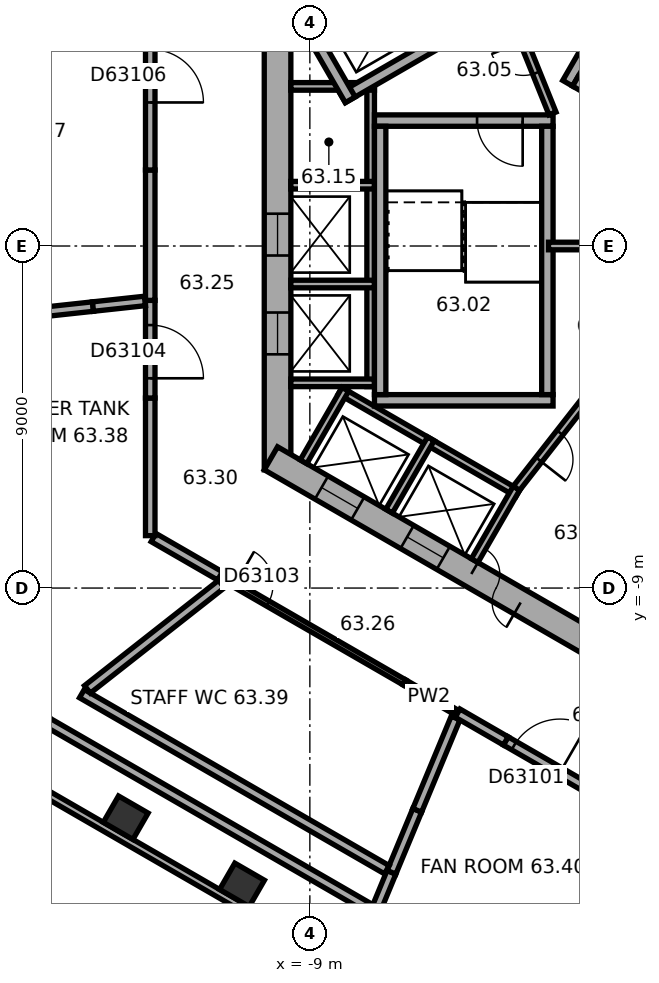
"""IFC4 building model, lengths in metres.
Left out: names, types, materials, properties, quantities, classifications, styles, units other than length and angle.
Written with IfcOpenShell. Run it as: python <this file> out.ifc"""

import sys

from ifc_helpers import new_model, si_unit, direction, frame, frame_2d, origin, origin_2d, place, context, subcontext, project, spatial, rectangle, extrude, element, fill, save


model = new_model("IFC4")
c1 = context("Model", 3, precision=1e-05, world=origin(), true_north=direction((0.0, 1.0)))
c2 = subcontext(c1, "Body", "Model", "MODEL_VIEW")
j1 = project(units=[si_unit("LENGTHUNIT", "METRE"), si_unit("PLANEANGLEUNIT", "RADIAN")], contexts=[c1])
p1 = place(None, origin())
s1 = spatial("IfcSite", under=j1, at=p1, CompositionType="ELEMENT")
p2 = place(p1, origin())
s2 = spatial("IfcBuilding", under=s1, at=p2, CompositionType="ELEMENT")
p3 = place(p2, frame((0.0, 0.0, 255.0)))
s3 = spatial("IfcBuildingStorey", under=s2, at=p3, CompositionType="ELEMENT", Elevation=255.0)
for number, where, z_axis, x_axis in (
    (1, (-13.845, -15.042, 0.0), (0.0, 0.0, 1.0), (0.866, -0.5, 0.0)),
    (2, (-10.785, -16.809, 0.0), (0.0, 0.0, 1.0), (0.866, -0.5, 0.0)),
):
    element("IfcColumn", number, at=place(p3, frame(where, z_axis=z_axis, x_axis=x_axis)), inside=s3, PredefinedType="COLUMN", context=c2, shape_type="SweptSolid", body=[
        extrude(rectangle(XDim=0.9, YDim=0.8, at=origin_2d()), origin(), (0.0, 0.0, 1.0), 4.8),
    ])
p4 = place(p3, frame((-9.85, 5.889, 0.0), z_axis=(0.0, 0.0, 1.0), x_axis=(0.0, -1.0, 0.0)))
e3 = element("IfcWall", 3, at=p4, inside=s3, PredefinedType="SHEAR", context=c2, shape_type="SweptSolid", body=[
    extrude(rectangle(XDim=11.778, YDim=0.7, at=frame_2d((5.889, 0.0))), origin(), (0.0, 0.0, 1.0), 4.8),
])
p5 = place(p4, frame((5.039, 0.0, 0.0)))
e4 = element("IfcOpeningElement", 4, at=p5, cuts=e3, PredefinedType="OPENING", context=c2, shape_type="SweptSolid", body=[
    extrude(rectangle(XDim=1.1, YDim=2.1, at=frame_2d((0.55, 1.05))), frame((0.0, 0.36, 0.0), z_axis=(0.0, -1.0, 0.0), x_axis=(1.0, 0.0, 0.0)), (0.0, 0.0, 1.0), 0.72),
])
p6 = place(p4, frame((7.639, 0.0, 0.0)))
e5 = element("IfcOpeningElement", 5, at=p6, cuts=e3, PredefinedType="OPENING", context=c2, shape_type="SweptSolid", body=[
    extrude(rectangle(XDim=1.1, YDim=2.1, at=frame_2d((0.55, 1.05))), frame((0.0, 0.36, 0.0), z_axis=(0.0, -1.0, 0.0), x_axis=(1.0, 0.0, 0.0)), (0.0, 0.0, 1.0), 0.72),
])
p7 = place(p3, frame((-10.025, -5.586, 0.0), z_axis=(0.0, 0.0, 1.0), x_axis=(0.866026453023, -0.499998182661, 0.0)))
e6 = element("IfcWall", 6, at=p7, inside=s3, PredefinedType="SHEAR", context=c2, shape_type="SweptSolid", body=[
    extrude(rectangle(XDim=11.778, YDim=0.7, at=frame_2d((5.889, 0.0))), origin(), (0.0, 0.0, 1.0), 4.8),
])
p8 = place(p7, frame((6.089, 0.0, 0.0)))
e7 = element("IfcOpeningElement", 7, at=p8, cuts=e6, PredefinedType="OPENING", context=c2, shape_type="SweptSolid", body=[
    extrude(rectangle(XDim=1.5, YDim=2.1, at=frame_2d((0.75, 1.05))), frame((0.0, 0.36, 0.0), z_axis=(0.0, -1.0, 0.0), x_axis=(1.0, 0.0, 0.0)), (0.0, 0.0, 1.0), 0.72),
])
p9 = place(p7, frame((1.539, 0.0, 0.0)))
e8 = element("IfcOpeningElement", 8, at=p9, cuts=e6, PredefinedType="OPENING", context=c2, shape_type="SweptSolid", body=[
    extrude(rectangle(XDim=1.1, YDim=2.1, at=frame_2d((0.55, 1.05))), frame((0.0, 0.36, 0.0), z_axis=(0.0, -1.0, 0.0), x_axis=(1.0, 0.0, 0.0)), (0.0, 0.0, 1.0), 0.72),
])
p10 = place(p7, frame((4.139, 0.0, 0.0)))
e9 = element("IfcOpeningElement", 9, at=p10, cuts=e6, PredefinedType="OPENING", context=c2, shape_type="SweptSolid", body=[
    extrude(rectangle(XDim=1.1, YDim=2.1, at=frame_2d((0.55, 1.05))), frame((0.0, 0.36, 0.0), z_axis=(0.0, -1.0, 0.0), x_axis=(1.0, 0.0, 0.0)), (0.0, 0.0, 1.0), 0.72),
])
p11 = place(p3, frame((-17.664, -13.415, 0.0), z_axis=(0.0, 0.0, 1.0), x_axis=(0.866026555358, -0.49999800541, 0.0)))
e10 = element("IfcWall", 10, at=p11, inside=s3, PredefinedType="STANDARD", context=c2, shape_type="SweptSolid", body=[
    extrude(rectangle(XDim=18.841, YDim=0.2, at=frame_2d((9.421, 0.0))), origin(), (0.0, 0.0, 1.0), 4.8),
])
p12 = place(p3, frame((-7.4, 4.3, 0.0), z_axis=(0.0, 0.0, 1.0), x_axis=(0.0, -1.0, 0.0)))
e11 = element("IfcWall", 11, at=p12, inside=s3, PredefinedType="PARTITIONING", context=c2, shape_type="SweptSolid", body=[
    extrude(rectangle(XDim=8.0, YDim=0.2, at=frame_2d((4.0, 0.0))), origin(), (0.0, 0.0, 1.0), 4.52),
])
for number, where, z_axis, x_axis in (
    (12, (-7.3, 4.2, 0.0), (0.0, 0.0, 1.0), (-1.0, 0.0, 0.0)),
    (13, (-7.3, 1.6, 0.0), (0.0, 0.0, 1.0), (-1.0, 0.0, 0.0)),
    (14, (-7.3, -1.0, 0.0), (0.0, 0.0, 1.0), (-1.0, 0.0, 0.0)),
    (15, (-7.3, -3.6, 0.0), (0.0, 0.0, 1.0), (-1.0, 0.0, 0.0)),
):
    element("IfcWall", number, at=place(p3, frame(where, z_axis=z_axis, x_axis=x_axis)), inside=s3, PredefinedType="PARTITIONING", context=c2, shape_type="SweptSolid", body=[
        extrude(rectangle(XDim=2.2, YDim=0.2, at=frame_2d((1.1, 0.0))), origin(), (0.0, 0.0, 1.0), 4.52),
    ])
p13 = place(p3, frame((-8.203, -3.809, 0.0), z_axis=(0.0, 0.0, 1.0), x_axis=(0.866028230842, -0.499995103361, 0.0)))
e16 = element("IfcWall", 16, at=p13, inside=s3, PredefinedType="PARTITIONING", context=c2, shape_type="SweptSolid", body=[
    extrude(rectangle(XDim=5.4, YDim=0.2, at=frame_2d((2.7, 0.0))), origin(), (0.0, 0.0, 1.0), 4.52),
])
for number, where, z_axis, x_axis in (
    (17, (-8.067, -3.772, 0.0), (0.0, 0.0, 1.0), (-0.5, -0.866, 0.0)),
    (18, (-5.815, -5.072, 0.0), (0.0, 0.0, 1.0), (-0.5, -0.866, 0.0)),
):
    element("IfcWall", number, at=place(p3, frame(where, z_axis=z_axis, x_axis=x_axis)), inside=s3, PredefinedType="PARTITIONING", context=c2, shape_type="SweptSolid", body=[
        extrude(rectangle(XDim=2.2, YDim=0.2, at=frame_2d((1.1, 0.0))), origin(), (0.0, 0.0, 1.0), 4.52),
    ])
p14 = place(p3, frame((-3.563, -6.372, 0.0), z_axis=(0.0, 0.0, 1.0), x_axis=(-0.499994660107, -0.866028486751, 0.0)))
e19 = element("IfcWall", 19, at=p14, inside=s3, PredefinedType="PARTITIONING", context=c2, shape_type="SweptSolid", body=[
    extrude(rectangle(XDim=2.2, YDim=0.2, at=frame_2d((1.1, 0.0))), origin(), (0.0, 0.0, 1.0), 4.52),
])
p15 = place(p3, frame((-2.216, 4.282, 0.0), z_axis=(0.0, 0.0, 1.0), x_axis=(0.499977259774, 0.866038532462, 0.0)))
e20 = element("IfcWall", 20, at=p15, inside=s3, PredefinedType="SHEAR", context=c2, shape_type="SweptSolid", body=[
    extrude(rectangle(XDim=4.7, YDim=0.3, at=frame_2d((2.35, 0.0))), origin(), (0.0, 0.0, 1.0), 4.52),
])
p16 = place(p3, frame((4.103, 0.807, 0.0), z_axis=(0.0, 0.0, 1.0), x_axis=(-0.866027801685, 0.499995846692, 0.0)))
e21 = element("IfcWall", 21, at=p16, inside=s3, PredefinedType="SHEAR", context=c2, shape_type="SweptSolid", body=[
    extrude(rectangle(XDim=7.06, YDim=0.3, at=frame_2d((3.53, 0.0))), origin(), (0.0, 0.0, 1.0), 4.52),
])
p17 = place(p3, frame((-2.6, 3.3, 0.0), z_axis=(0.0, 0.0, 1.0), x_axis=(-1.0, 0.0, 0.0)))
e22 = element("IfcWall", 22, at=p17, inside=s3, PredefinedType="SHEAR", context=c2, shape_type="SweptSolid", body=[
    extrude(rectangle(XDim=4.7, YDim=0.3, at=frame_2d((2.35, 0.0))), origin(), (0.0, 0.0, 1.0), 4.52),
])
p18 = place(p17, frame((0.8, 0.0, 0.0)))
e23 = element("IfcOpeningElement", 23, at=p18, cuts=e22, PredefinedType="OPENING", context=c2, shape_type="SweptSolid", body=[
    extrude(rectangle(XDim=1.2, YDim=2.1, at=frame_2d((0.6, 1.05))), frame((0.0, 0.16, 0.0), z_axis=(0.0, -1.0, 0.0), x_axis=(1.0, 0.0, 0.0)), (0.0, 0.0, 1.0), 0.32),
])
p19 = place(p3, frame((-2.6, -4.06, 0.0), z_axis=(0.0, 0.0, 1.0), x_axis=(-1.0, 0.0, 0.0)))
e24 = element("IfcWall", 24, at=p19, inside=s3, PredefinedType="SHEAR", context=c2, shape_type="SweptSolid", body=[
    extrude(rectangle(XDim=4.7, YDim=0.3, at=frame_2d((2.35, 0.0))), origin(), (0.0, 0.0, 1.0), 4.52),
])
for number, where, z_axis, x_axis in (
    (25, (-2.75, 3.15, 0.0), (0.0, 0.0, 1.0), (0.0, -1.0, 0.0)),
    (26, (-7.15, 3.15, 0.0), (0.0, 0.0, 1.0), (0.0, -1.0, 0.0)),
):
    element("IfcWall", number, at=place(p3, frame(where, z_axis=z_axis, x_axis=x_axis)), inside=s3, PredefinedType="SHEAR", context=c2, shape_type="SweptSolid", body=[
        extrude(rectangle(XDim=7.06, YDim=0.3, at=frame_2d((3.53, 0.0))), origin(), (0.0, 0.0, 1.0), 4.52),
    ])
p20 = place(p3, frame((-5.24, 5.577, 0.0), z_axis=(0.0, 0.0, 1.0), x_axis=(-0.866014461049, -0.500018952895, 0.0)))
e27 = element("IfcWall", 27, at=p20, inside=s3, PredefinedType="SHEAR", context=c2, shape_type="SweptSolid", body=[
    extrude(rectangle(XDim=3.35, YDim=0.3, at=frame_2d((1.675, 0.0))), origin(), (0.0, 0.0, 1.0), 4.52),
])
p21 = place(p3, frame((-7.937, 3.847, 0.0), z_axis=(0.0, 0.0, 1.0), x_axis=(-0.50002983664, 0.866008176907, 0.0)))
e28 = element("IfcWall", 28, at=p21, inside=s3, PredefinedType="SHEAR", context=c2, shape_type="SweptSolid", body=[
    extrude(rectangle(XDim=2.2, YDim=0.3, at=frame_2d((1.1, 0.0))), origin(), (0.0, 0.0, 1.0), 4.52),
])
p22 = place(p3, frame((-2.615, 3.487, 0.0), z_axis=(0.0, 0.0, 1.0), x_axis=(-0.373576831041, 0.92759924068, 0.0)))
e29 = element("IfcWall", 29, at=p22, inside=s3, PredefinedType="PARTITIONING", context=c2, shape_type="SweptSolid", body=[
    extrude(rectangle(XDim=3.002, YDim=0.2, at=frame_2d((1.501, 0.0))), origin(), (0.0, 0.0, 1.0), 4.52),
])
p23 = place(p22, frame((1.15, 0.0, 0.0)))
e30 = element("IfcOpeningElement", 30, at=p23, cuts=e29, PredefinedType="OPENING", context=c2, shape_type="SweptSolid", body=[
    extrude(rectangle(XDim=0.9, YDim=2.1, at=frame_2d((0.45, 1.05))), frame((0.0, 0.11, 0.0), z_axis=(0.0, -1.0, 0.0), x_axis=(1.0, 0.0, 0.0)), (0.0, 0.0, 1.0), 0.22),
])
p24 = place(p3, frame((-1.712, -4.008, 0.0), z_axis=(0.0, 0.0, 1.0), x_axis=(-0.616549420702, -0.787316208287, 0.0)))
e31 = element("IfcWall", 31, at=p24, inside=s3, PredefinedType="PARTITIONING", context=c2, shape_type="SweptSolid", body=[
    extrude(rectangle(XDim=3.002, YDim=0.2, at=frame_2d((1.501, 0.0))), origin(), (0.0, 0.0, 1.0), 4.52),
])
p25 = place(p24, frame((1.15, 0.0, 0.0)))
e32 = element("IfcOpeningElement", 32, at=p25, cuts=e31, PredefinedType="OPENING", context=c2, shape_type="SweptSolid", body=[
    extrude(rectangle(XDim=0.9, YDim=2.1, at=frame_2d((0.45, 1.05))), frame((0.0, 0.11, 0.0), z_axis=(0.0, -1.0, 0.0), x_axis=(1.0, 0.0, 0.0)), (0.0, 0.0, 1.0), 0.22),
])
p26 = place(p3, frame((-0.68, 0.0, 0.0), z_axis=(0.0, 0.0, 1.0), x_axis=(-1.0, 0.0, 0.0)))
e33 = element("IfcWall", 33, at=p26, inside=s3, PredefinedType="PARTITIONING", context=c2, shape_type="SweptSolid", body=[
    extrude(rectangle(XDim=2.04, YDim=0.2, at=frame_2d((1.02, 0.0))), origin(), (0.0, 0.0, 1.0), 4.52),
])
p27 = place(p3, frame((-7.292, -17.504, 0.0), z_axis=(0.0, 0.0, 1.0), x_axis=(-0.866024002353, 0.500002427343, 0.0)))
e34 = element("IfcWall", 34, at=p27, inside=s3, PredefinedType="SOLIDWALL", context=c2, shape_type="SweptSolid", body=[
    extrude(rectangle(XDim=9.964, YDim=0.25, at=frame_2d((4.982, 0.0))), origin(), (0.0, 0.0, 1.0), 4.02),
])
p28 = place(p3, frame((-7.223, -17.375, 0.0), z_axis=(0.0, 0.0, 1.0), x_axis=(0.382374085118, 0.924007607669, 0.0)))
e35 = element("IfcWall", 35, at=p28, inside=s3, PredefinedType="SOLIDWALL", context=c2, shape_type="SweptSolid", body=[
    extrude(rectangle(XDim=0.967, YDim=0.25, at=frame_2d((0.484, 0.0))), origin(), (0.0, 0.0, 1.0), 3.6),
])
p29 = place(p3, frame((-6.853, -16.479, 0.0), z_axis=(0.0, 0.0, 1.0), x_axis=(0.38378052161, 0.923424339745, 0.0)))
e36 = element("IfcWall", 36, at=p29, inside=s3, PredefinedType="SOLIDWALL", context=c2, shape_type="SweptSolid", body=[
    extrude(rectangle(XDim=1.765, YDim=0.25, at=frame_2d((0.883, 0.0))), origin(), (0.0, 0.0, 1.0), 3.6),
])
p30 = place(p3, frame((-6.975, -16.411, 0.0), z_axis=(0.0, 0.0, 1.0), x_axis=(-0.866045613381, 0.499964994319, 0.0)))
e37 = element("IfcWall", 37, at=p30, inside=s3, PredefinedType="SOLIDWALL", context=c2, shape_type="SweptSolid", body=[
    extrude(rectangle(XDim=9.265, YDim=0.25, at=frame_2d((4.633, 0.0))), origin(), (0.0, 0.0, 1.0), 4.52),
])
p31 = place(p3, frame((-6.175, -14.848, 0.0), z_axis=(0.0, 0.0, 1.0), x_axis=(0.383969284398, 0.923345866205, 0.0)))
e38 = element("IfcWall", 38, at=p31, inside=s3, PredefinedType="SOLIDWALL", context=c2, shape_type="SweptSolid", body=[
    extrude(rectangle(XDim=2.63, YDim=0.25, at=frame_2d((1.315, 0.0))), origin(), (0.0, 0.0, 1.0), 3.6),
])
p32 = place(p3, frame((-1.062, -14.629, 0.0), z_axis=(0.0, 0.0, 1.0), x_axis=(-0.866018596809, 0.500011789842, 0.0)))
e39 = element("IfcWall", 39, at=p32, inside=s3, PredefinedType="SOLIDWALL", context=c2, shape_type="SweptSolid", body=[
    extrude(rectangle(XDim=3.214, YDim=0.25, at=frame_2d((1.607, 0.0))), origin(), (0.0, 0.0, 1.0), 4.52),
])
p33 = place(p32, frame((1.564, 0.0, 0.0)))
e40 = element("IfcOpeningElement", 40, at=p33, cuts=e39, PredefinedType="OPENING", context=c2, shape_type="SweptSolid", body=[
    extrude(rectangle(XDim=1.4, YDim=2.1, at=frame_2d((0.7, 1.05))), frame((0.0, 0.135, 0.0), z_axis=(0.0, -1.0, 0.0), x_axis=(1.0, 0.0, 0.0)), (0.0, 0.0, 1.0), 0.27),
])
p34 = place(p3, frame((-3.845, -13.022, 0.0), z_axis=(0.0, 0.0, 1.0), x_axis=(-0.866088314402, 0.499891019779, 0.0)))
e41 = element("IfcWall", 41, at=p34, inside=s3, PredefinedType="SOLIDWALL", context=c2, shape_type="SweptSolid", body=[
    extrude(rectangle(XDim=1.463, YDim=0.25, at=frame_2d((0.731, 0.0))), origin(), (0.0, 0.0, 1.0), 4.52),
])
p35 = place(p3, frame((-14.853, -11.666, 0.0), z_axis=(0.0, 0.0, 1.0), x_axis=(0.786320228008, 0.617819147506, 0.0)))
e42 = element("IfcWall", 42, at=p35, inside=s3, PredefinedType="SOLIDWALL", context=c2, shape_type="SweptSolid", body=[
    extrude(rectangle(XDim=4.484, YDim=0.25, at=frame_2d((2.242, 0.0))), origin(), (0.0, 0.0, 1.0), 3.6),
])
p36 = place(p3, frame((-6.513, -11.481, 0.0), z_axis=(0.0, 0.0, 1.0), x_axis=(0.866009279501, -0.500027927039, 0.0)))
e43 = element("IfcWall", 43, at=p36, inside=s3, PredefinedType="PARTITIONING", context=c2, shape_type="SweptSolid", body=[
    extrude(rectangle(XDim=1.499, YDim=0.15, at=frame_2d((0.75, 0.0))), origin(), (0.0, 0.0, 1.0), 4.52),
])
p37 = place(p3, frame((-11.186, -8.784, 0.0), z_axis=(0.0, 0.0, 1.0), x_axis=(0.866020546064, -0.500008413725, 0.0)))
e44 = element("IfcWall", 44, at=p37, inside=s3, PredefinedType="PARTITIONING", context=c2, shape_type="SweptSolid", body=[
    extrude(rectangle(XDim=5.395, YDim=0.15, at=frame_2d((2.698, 0.0))), origin(), (0.0, 0.0, 1.0), 4.52),
])
p38 = place(p37, frame((0.25, 0.0, 0.0)))
e45 = element("IfcOpeningElement", 45, at=p38, cuts=e44, PredefinedType="OPENING", context=c2, shape_type="SweptSolid", body=[
    extrude(rectangle(XDim=1.0, YDim=2.1, at=frame_2d((0.5, 1.05))), frame((0.0, 0.085, 0.0), z_axis=(0.0, -1.0, 0.0), x_axis=(1.0, 0.0, 0.0)), (0.0, 0.0, 1.0), 0.17),
])
p39 = place(p3, frame((-11.363, -8.681, 0.0), z_axis=(0.0, 0.0, 1.0), x_axis=(0.865888002441, -0.500237910626, 0.0)))
e46 = element("IfcWall", 46, at=p39, inside=s3, PredefinedType="SOLIDWALL", context=c2, shape_type="SweptSolid", body=[
    extrude(rectangle(XDim=0.205, YDim=0.25, at=frame_2d((0.103, 0.0))), origin(), (0.0, 0.0, 1.0), 4.52),
])
p40 = place(p3, frame((-13.113, -7.671, 0.0), z_axis=(0.0, 0.0, 1.0), x_axis=(0.866026663364, -0.499997818338, 0.0)))
e47 = element("IfcWall", 47, at=p40, inside=s3, PredefinedType="SOLIDWALL", context=c2, shape_type="SweptSolid", body=[
    extrude(rectangle(XDim=2.021, YDim=0.25, at=frame_2d((1.01, 0.0))), origin(), (0.0, 0.0, 1.0), 4.52),
])
p41 = place(p3, frame((-13.2, -7.621, 0.0), z_axis=(0.0, 0.0, 1.0), x_axis=(0.0, 1.0, 0.0)))
e48 = element("IfcWall", 48, at=p41, inside=s3, PredefinedType="SOLIDWALL", context=c2, shape_type="SweptSolid", body=[
    extrude(rectangle(XDim=3.621, YDim=0.25, at=frame_2d((1.811, 0.0))), origin(), (0.0, 0.0, 1.0), 4.52),
])
p42 = place(p3, frame((-13.2, -4.0, 0.0), z_axis=(0.0, 0.0, 1.0), x_axis=(0.0, 1.0, 0.0)))
e49 = element("IfcWall", 49, at=p42, inside=s3, PredefinedType="SOLIDWALL", context=c2, shape_type="SweptSolid", body=[
    extrude(rectangle(XDim=2.57, YDim=0.25, at=frame_2d((1.285, 0.0))), origin(), (0.0, 0.0, 1.0), 4.52),
])
p43 = place(p42, frame((0.52, 0.0, 0.0)))
e50 = element("IfcOpeningElement", 50, at=p43, cuts=e49, PredefinedType="OPENING", context=c2, shape_type="SweptSolid", body=[
    extrude(rectangle(XDim=1.4, YDim=2.1, at=frame_2d((0.7, 1.05))), frame((0.0, 0.135, 0.0), z_axis=(0.0, -1.0, 0.0), x_axis=(1.0, 0.0, 0.0)), (0.0, 0.0, 1.0), 0.27),
])
p44 = place(p3, frame((-14.707, -1.594, 0.0), z_axis=(0.0, 0.0, 1.0), x_axis=(-0.994177266682, -0.107756959931, 0.0)))
e51 = element("IfcWall", 51, at=p44, inside=s3, PredefinedType="SOLIDWALL", context=c2, shape_type="SweptSolid", body=[
    extrude(rectangle(XDim=3.888, YDim=0.25, at=frame_2d((1.944, 0.0))), origin(), (0.0, 0.0, 1.0), 3.6),
])
p45 = place(p3, frame((-14.707, -1.594, 0.0), z_axis=(0.0, 0.0, 1.0), x_axis=(0.994197816276, 0.107567198119, 0.0)))
e52 = element("IfcWall", 52, at=p45, inside=s3, PredefinedType="SOLIDWALL", context=c2, shape_type="SweptSolid", body=[
    extrude(rectangle(XDim=1.375, YDim=0.25, at=frame_2d((0.688, 0.0))), origin(), (0.0, 0.0, 1.0), 3.6),
])
p46 = place(p3, frame((-13.2, -1.43, 0.0), z_axis=(0.0, 0.0, 1.0), x_axis=(0.0, 1.0, 0.0)))
e53 = element("IfcWall", 53, at=p46, inside=s3, PredefinedType="SOLIDWALL", context=c2, shape_type="SweptSolid", body=[
    extrude(rectangle(XDim=3.43, YDim=0.25, at=frame_2d((1.715, 0.0))), origin(), (0.0, 0.0, 1.0), 4.52),
])
p47 = place(p3, frame((-13.2, 2.0, 0.0), z_axis=(0.0, 0.0, 1.0), x_axis=(0.0, 1.0, 0.0)))
e54 = element("IfcWall", 54, at=p47, inside=s3, PredefinedType="SOLIDWALL", context=c2, shape_type="SweptSolid", body=[
    extrude(rectangle(XDim=3.427, YDim=0.25, at=frame_2d((1.713, 0.0))), origin(), (0.0, 0.0, 1.0), 4.52),
])
p48 = place(p47, frame((1.777, 0.0, 0.0)))
e55 = element("IfcOpeningElement", 55, at=p48, cuts=e54, PredefinedType="OPENING", context=c2, shape_type="SweptSolid", body=[
    extrude(rectangle(XDim=1.4, YDim=2.1, at=frame_2d((0.7, 1.05))), frame((0.0, 0.135, 0.0), z_axis=(0.0, -1.0, 0.0), x_axis=(1.0, 0.0, 0.0)), (0.0, 0.0, 1.0), 0.27),
])
p49 = place(p8, origin())
e56 = element("IfcDoor", 56, at=p49, inside=s3, OperationType="DOUBLE_DOOR_SINGLE_SWING", PredefinedType="DOOR", context=c2, shape_type="SweptSolid", body=[
    extrude(rectangle(XDim=1.5, YDim=2.1, at=frame_2d((0.75, 1.05))), frame((0.0, 0.025, 0.0), z_axis=(0.0, -1.0, 0.0), x_axis=(1.0, 0.0, 0.0)), (0.0, 0.0, 1.0), 0.05),
])
fill(e7, e56)
p50 = place(p18, origin())
e57 = element("IfcDoor", 57, at=p50, inside=s3, OperationType="SINGLE_SWING_RIGHT", PredefinedType="DOOR", context=c2, shape_type="SweptSolid", body=[
    extrude(rectangle(XDim=1.2, YDim=2.1, at=frame_2d((0.6, 1.05))), frame((0.0, 0.025, 0.0), z_axis=(0.0, -1.0, 0.0), x_axis=(1.0, 0.0, 0.0)), (0.0, 0.0, 1.0), 0.05),
])
fill(e23, e57)
p51 = place(p23, origin())
e58 = element("IfcDoor", 58, at=p51, inside=s3, OperationType="SINGLE_SWING_LEFT", PredefinedType="DOOR", context=c2, shape_type="SweptSolid", body=[
    extrude(rectangle(XDim=0.9, YDim=2.1, at=frame_2d((0.45, 1.05))), frame((0.0, 0.025, 0.0), z_axis=(0.0, -1.0, 0.0), x_axis=(1.0, 0.0, 0.0)), (0.0, 0.0, 1.0), 0.05),
])
fill(e30, e58)
p52 = place(p25, origin())
e59 = element("IfcDoor", 59, at=p52, inside=s3, OperationType="SINGLE_SWING_LEFT", PredefinedType="DOOR", context=c2, shape_type="SweptSolid", body=[
    extrude(rectangle(XDim=0.9, YDim=2.1, at=frame_2d((0.45, 1.05))), frame((0.0, 0.025, 0.0), z_axis=(0.0, -1.0, 0.0), x_axis=(1.0, 0.0, 0.0)), (0.0, 0.0, 1.0), 0.05),
])
fill(e32, e59)
p53 = place(p5, origin())
e60 = element("IfcDoor", 60, at=p53, inside=s3, OperationType="DOUBLE_DOOR_SLIDING", PredefinedType="DOOR", context=c2, shape_type="SweptSolid", body=[
    extrude(rectangle(XDim=1.1, YDim=2.1, at=frame_2d((0.55, 1.05))), frame((0.0, 0.025, 0.0), z_axis=(0.0, -1.0, 0.0), x_axis=(1.0, 0.0, 0.0)), (0.0, 0.0, 1.0), 0.05),
])
fill(e4, e60)
p54 = place(p6, origin())
e61 = element("IfcDoor", 61, at=p54, inside=s3, OperationType="DOUBLE_DOOR_SLIDING", PredefinedType="DOOR", context=c2, shape_type="SweptSolid", body=[
    extrude(rectangle(XDim=1.1, YDim=2.1, at=frame_2d((0.55, 1.05))), frame((0.0, 0.025, 0.0), z_axis=(0.0, -1.0, 0.0), x_axis=(1.0, 0.0, 0.0)), (0.0, 0.0, 1.0), 0.05),
])
fill(e5, e61)
p55 = place(p9, origin())
e62 = element("IfcDoor", 62, at=p55, inside=s3, OperationType="DOUBLE_DOOR_SLIDING", PredefinedType="DOOR", context=c2, shape_type="SweptSolid", body=[
    extrude(rectangle(XDim=1.1, YDim=2.1, at=frame_2d((0.55, 1.05))), frame((0.0, 0.025, 0.0), z_axis=(0.0, -1.0, 0.0), x_axis=(1.0, 0.0, 0.0)), (0.0, 0.0, 1.0), 0.05),
])
fill(e8, e62)
p56 = place(p10, origin())
e63 = element("IfcDoor", 63, at=p56, inside=s3, OperationType="DOUBLE_DOOR_SLIDING", PredefinedType="DOOR", context=c2, shape_type="SweptSolid", body=[
    extrude(rectangle(XDim=1.1, YDim=2.1, at=frame_2d((0.55, 1.05))), frame((0.0, 0.025, 0.0), z_axis=(0.0, -1.0, 0.0), x_axis=(1.0, 0.0, 0.0)), (0.0, 0.0, 1.0), 0.05),
])
fill(e9, e63)
p57 = place(p33, origin())
e64 = element("IfcDoor", 64, at=p57, inside=s3, OperationType="SINGLE_SWING_LEFT", PredefinedType="DOOR", context=c2, shape_type="SweptSolid", body=[
    extrude(rectangle(XDim=1.4, YDim=2.1, at=frame_2d((0.7, 1.05))), frame((0.0, 0.025, 0.0), z_axis=(0.0, -1.0, 0.0), x_axis=(1.0, 0.0, 0.0)), (0.0, 0.0, 1.0), 0.05),
])
fill(e40, e64)
p58 = place(p38, origin())
e65 = element("IfcDoor", 65, at=p58, inside=s3, OperationType="SINGLE_SWING_LEFT", PredefinedType="DOOR", context=c2, shape_type="SweptSolid", body=[
    extrude(rectangle(XDim=1.0, YDim=2.1, at=frame_2d((0.5, 1.05))), frame((0.0, 0.025, 0.0), z_axis=(0.0, -1.0, 0.0), x_axis=(1.0, 0.0, 0.0)), (0.0, 0.0, 1.0), 0.05),
])
fill(e45, e65)
p59 = place(p43, origin())
e66 = element("IfcDoor", 66, at=p59, inside=s3, OperationType="SINGLE_SWING_LEFT", PredefinedType="DOOR", context=c2, shape_type="SweptSolid", body=[
    extrude(rectangle(XDim=1.4, YDim=2.1, at=frame_2d((0.7, 1.05))), frame((0.0, 0.025, 0.0), z_axis=(0.0, -1.0, 0.0), x_axis=(1.0, 0.0, 0.0)), (0.0, 0.0, 1.0), 0.05),
])
fill(e50, e66)
p60 = place(p48, origin())
e67 = element("IfcDoor", 67, at=p60, inside=s3, OperationType="SINGLE_SWING_LEFT", PredefinedType="DOOR", context=c2, shape_type="SweptSolid", body=[
    extrude(rectangle(XDim=1.4, YDim=2.1, at=frame_2d((0.7, 1.05))), frame((0.0, 0.025, 0.0), z_axis=(0.0, -1.0, 0.0), x_axis=(1.0, 0.0, 0.0)), (0.0, 0.0, 1.0), 0.05),
])
fill(e55, e67)
save(model, sys.argv[1])
